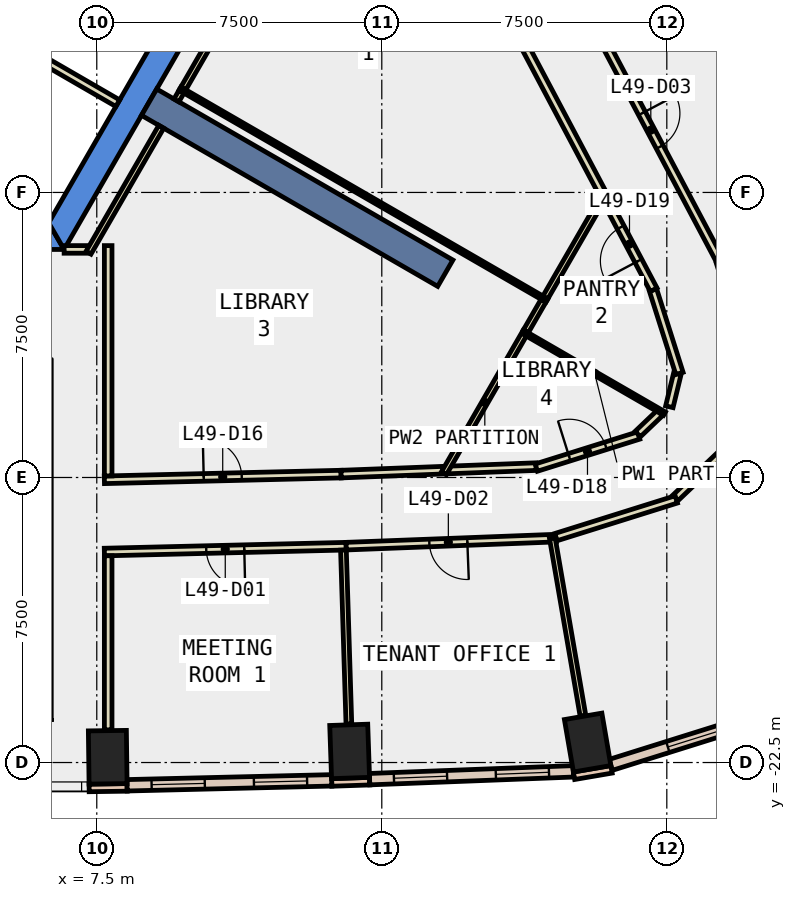
"""IFC4 building model, lengths in metres.
Left out: names, types, materials, properties, quantities, classifications, styles, units other than length and angle.
Written with IfcOpenShell. Run it as: python <this file> out.ifc"""

import sys

from ifc_helpers import new_model, si_unit, direction, frame, frame_2d, origin, origin_2d, place, context, subcontext, project, spatial, polyline, rectangle, outline, extrude, element, fill, save


model = new_model("IFC4")
c1 = context("Model", 3, precision=1e-05, world=origin(), true_north=direction((0.0, 1.0)))
c2 = subcontext(c1, "Body", "Model", "MODEL_VIEW")
j1 = project(units=[si_unit("LENGTHUNIT", "METRE"), si_unit("PLANEANGLEUNIT", "RADIAN")], contexts=[c1])
p1 = place(None, origin())
s1 = spatial("IfcSite", under=j1, at=p1, CompositionType="ELEMENT")
p2 = place(p1, origin())
s2 = spatial("IfcBuilding", under=s1, at=p2, CompositionType="ELEMENT")
p3 = place(p2, frame((0.0, 0.0, 219.2)))
s3 = spatial("IfcBuildingStorey", under=s2, at=p3, CompositionType="ELEMENT", Elevation=219.2)
for number, where, z_axis, x_axis in (
    (1, (7.788, -22.361, -0.4), (0.0, 0.0, 1.0), (1.0, 0.013, 0.0)),
    (2, (14.154, -22.208, -0.4), (0.0, 0.0, 1.0), (0.999, 0.034, 0.0)),
    (3, (20.417, -21.975, -0.4), (0.0, 0.0, 1.0), (0.986, 0.169, 0.0)),
):
    element("IfcColumn", number, at=place(p3, frame(where, z_axis=z_axis, x_axis=x_axis)), inside=s3, PredefinedType="COLUMN", context=c2, shape_type="SweptSolid", body=[
        extrude(rectangle(XDim=1.0, YDim=1.4, at=origin_2d()), origin(), (0.0, 0.0, 1.0), 4.2),
    ])
p4 = place(p3, frame((0.0, 0.0, -0.4)))
e4 = element("IfcWall", 4, at=p4, inside=s3, PredefinedType="SHEAR", context=c2, shape_type="SweptSolid", body=[
    extrude(outline(polyline([(5.75, -8.3), (5.75, -9.0), (6.64, -9.0), (6.235, -8.3), (5.75, -8.3)])), origin(), (0.0, 0.0, 1.0), 4.2),
])
p5 = place(p3, frame((0.0, 0.0, -0.4)))
e5 = element("IfcWall", 5, at=p5, inside=s3, PredefinedType="SHEAR", context=c2, shape_type="SweptSolid", body=[
    extrude(outline(polyline([(6.64, -9.0), (13.279, 2.5), (12.471, 2.5), (6.235, -8.3), (6.64, -9.0)])), origin(), (0.0, 0.0, 1.0), 4.2),
])
p6 = place(p3, frame((8.877, -5.125, -0.4), z_axis=(0.0, 0.0, 1.0), x_axis=(0.866017533419, -0.500013631625, 0.0)))
e6 = element("IfcWall", 6, at=p6, inside=s3, PredefinedType="SHEAR", context=c2, shape_type="SweptSolid", body=[
    extrude(rectangle(XDim=9.0, YDim=0.8, at=frame_2d((4.5, 0.0))), origin(), (0.0, 0.0, 1.0), 4.2),
])
p7 = place(p3, frame((7.299, -23.168, 0.0), z_axis=(0.0, 0.0, 1.0), x_axis=(0.999903186316, 0.013914668364, 0.0)))
e7 = element("IfcWall", 7, at=p7, inside=s3, PredefinedType="STANDARD", context=c2, shape_type="SweptSolid", body=[
    extrude(rectangle(XDim=1.0, YDim=0.2, at=frame_2d((0.5, 0.0))), origin(), (0.0, 0.0, 1.0), 3.8),
])
p8 = place(p3, frame((13.682, -23.024, 0.0), z_axis=(0.0, 0.0, 1.0), x_axis=(0.999423561854, 0.033949138587, 0.0)))
e8 = element("IfcWall", 8, at=p8, inside=s3, PredefinedType="STANDARD", context=c2, shape_type="SweptSolid", body=[
    extrude(rectangle(XDim=1.0, YDim=0.2, at=frame_2d((0.5, 0.0))), origin(), (0.0, 0.0, 1.0), 3.8),
])
p9 = place(p3, frame((20.059, -22.848, 0.0), z_axis=(0.0, 0.0, 1.0), x_axis=(0.985631544579, 0.168909615862, 0.0)))
e9 = element("IfcWall", 9, at=p9, inside=s3, PredefinedType="STANDARD", context=c2, shape_type="SweptSolid", body=[
    extrude(rectangle(XDim=1.0, YDim=0.2, at=frame_2d((0.5, 0.0))), origin(), (0.0, 0.0, 1.0), 3.8),
])
p10 = place(p3, frame((8.297, -23.099, 0.0), z_axis=(0.0, 0.0, 1.0), x_axis=(0.999708030006, 0.024163086341, 0.0)))
e10 = element("IfcWall", 10, at=p10, inside=s3, PredefinedType="STANDARD", context=c2, shape_type="SweptSolid", body=[
    extrude(rectangle(XDim=5.385, YDim=0.3, at=frame_2d((2.693, 0.0))), origin(), (0.0, 0.0, 1.0), 3.8),
])
p11 = place(p10, frame((0.646, 0.0, 0.9)))
e11 = element("IfcOpeningElement", 11, at=p11, cuts=e10, PredefinedType="OPENING", context=c2, shape_type="SweptSolid", body=[
    extrude(rectangle(XDim=1.4, YDim=2.6, at=frame_2d((0.7, 1.3))), frame((0.0, 0.16, 0.0), z_axis=(0.0, -1.0, 0.0), x_axis=(1.0, 0.0, 0.0)), (0.0, 0.0, 1.0), 0.32),
])
p12 = place(p10, frame((3.339, 0.0, 0.9)))
e12 = element("IfcOpeningElement", 12, at=p12, cuts=e10, PredefinedType="OPENING", context=c2, shape_type="SweptSolid", body=[
    extrude(rectangle(XDim=1.4, YDim=2.6, at=frame_2d((0.7, 1.3))), frame((0.0, 0.16, 0.0), z_axis=(0.0, -1.0, 0.0), x_axis=(1.0, 0.0, 0.0)), (0.0, 0.0, 1.0), 0.32),
])
p13 = place(p3, frame((14.679, -22.938, 0.0), z_axis=(0.0, 0.0, 1.0), x_axis=(0.99926218254, 0.038406907512, 0.0)))
e13 = element("IfcWall", 13, at=p13, inside=s3, PredefinedType="STANDARD", context=c2, shape_type="SweptSolid", body=[
    extrude(rectangle(XDim=5.365, YDim=0.3, at=frame_2d((2.683, 0.0))), origin(), (0.0, 0.0, 1.0), 3.8),
])
p14 = place(p13, frame((0.641, 0.0, 0.9)))
e14 = element("IfcOpeningElement", 14, at=p14, cuts=e13, PredefinedType="OPENING", context=c2, shape_type="SweptSolid", body=[
    extrude(rectangle(XDim=1.4, YDim=2.6, at=frame_2d((0.7, 1.3))), frame((0.0, 0.16, 0.0), z_axis=(0.0, -1.0, 0.0), x_axis=(1.0, 0.0, 0.0)), (0.0, 0.0, 1.0), 0.32),
])
p15 = place(p13, frame((3.324, 0.0, 0.9)))
e15 = element("IfcOpeningElement", 15, at=p15, cuts=e13, PredefinedType="OPENING", context=c2, shape_type="SweptSolid", body=[
    extrude(rectangle(XDim=1.4, YDim=2.6, at=frame_2d((0.7, 1.3))), frame((0.0, 0.16, 0.0), z_axis=(0.0, -1.0, 0.0), x_axis=(1.0, 0.0, 0.0)), (0.0, 0.0, 1.0), 0.32),
])
p16 = place(p3, frame((21.024, -22.562, 0.0), z_axis=(0.0, 0.0, 1.0), x_axis=(0.954297481837, 0.298858354675, 0.0)))
e16 = element("IfcWall", 16, at=p16, inside=s3, PredefinedType="STANDARD", context=c2, shape_type="SweptSolid", body=[
    extrude(rectangle(XDim=4.551, YDim=0.3, at=frame_2d((2.275, 0.0))), origin(), (0.0, 0.0, 1.0), 3.8),
])
p17 = place(p16, frame((1.575, 0.0, 0.9)))
e17 = element("IfcOpeningElement", 17, at=p17, cuts=e16, PredefinedType="OPENING", context=c2, shape_type="SweptSolid", body=[
    extrude(rectangle(XDim=1.4, YDim=2.6, at=frame_2d((0.7, 1.3))), frame((0.0, 0.16, 0.0), z_axis=(0.0, -1.0, 0.0), x_axis=(1.0, 0.0, 0.0)), (0.0, 0.0, 1.0), 0.32),
])
p18 = place(p3, frame((7.7, -15.061, 0.0), z_axis=(0.0, 0.0, 1.0), x_axis=(0.999709615165, 0.024097413707, 0.0)))
e18 = element("IfcWall", 18, at=p18, inside=s3, PredefinedType="PARTITIONING", context=c2, shape_type="SweptSolid", body=[
    extrude(rectangle(XDim=6.231, YDim=0.2, at=frame_2d((3.115, 0.0))), origin(), (0.0, 0.0, 1.0), 3.8),
])
p19 = place(p18, frame((2.615, 0.0, 0.0)))
e19 = element("IfcOpeningElement", 19, at=p19, cuts=e18, PredefinedType="OPENING", context=c2, shape_type="SweptSolid", body=[
    extrude(rectangle(XDim=1.0, YDim=2.1, at=frame_2d((0.5, 1.05))), frame((0.0, 0.11, 0.0), z_axis=(0.0, -1.0, 0.0), x_axis=(1.0, 0.0, 0.0)), (0.0, 0.0, 1.0), 0.22),
])
p20 = place(p3, frame((13.929, -14.911, 0.0), z_axis=(0.0, 0.0, 1.0), x_axis=(0.99926480204, 0.038338693307, 0.0)))
e20 = element("IfcWall", 20, at=p20, inside=s3, PredefinedType="PARTITIONING", context=c2, shape_type="SweptSolid", body=[
    extrude(rectangle(XDim=2.681, YDim=0.2, at=frame_2d((1.34, 0.0))), origin(), (0.0, 0.0, 1.0), 3.8),
])
p21 = place(p3, frame((20.882, -7.659, 0.0), z_axis=(0.0, 0.0, 1.0), x_axis=(-0.468206254133, 0.883619207346, 0.0)))
e21 = element("IfcWall", 21, at=p21, inside=s3, PredefinedType="PARTITIONING", context=c2, shape_type="SweptSolid", body=[
    extrude(rectangle(XDim=4.93, YDim=0.2, at=frame_2d((2.465, 0.0))), origin(), (0.0, 0.0, 1.0), 3.8),
])
p22 = place(p3, frame((16.757, -14.802, 0.0), z_axis=(0.0, 0.0, 1.0), x_axis=(0.999273784151, 0.038103862122, 0.0)))
e22 = element("IfcWall", 22, at=p22, inside=s3, PredefinedType="PARTITIONING", context=c2, shape_type="SweptSolid", body=[
    extrude(rectangle(XDim=2.307, YDim=0.2, at=frame_2d((1.153, 0.0))), origin(), (0.0, 0.0, 1.0), 3.8),
])
p23 = place(p3, frame((19.066, -14.74, 0.0), z_axis=(0.0, 0.0, 1.0), x_axis=(0.954238004552, 0.299048207935, 0.0)))
e23 = element("IfcWall", 23, at=p23, inside=s3, PredefinedType="PARTITIONING", context=c2, shape_type="SweptSolid", body=[
    extrude(rectangle(XDim=2.822, YDim=0.2, at=frame_2d((1.411, 0.0))), origin(), (0.0, 0.0, 1.0), 3.8),
])
p24 = place(p23, frame((0.911, 0.0, 0.0)))
e24 = element("IfcOpeningElement", 24, at=p24, cuts=e23, PredefinedType="OPENING", context=c2, shape_type="SweptSolid", body=[
    extrude(rectangle(XDim=1.0, YDim=2.1, at=frame_2d((0.5, 1.05))), frame((0.0, 0.11, 0.0), z_axis=(0.0, -1.0, 0.0), x_axis=(1.0, 0.0, 0.0)), (0.0, 0.0, 1.0), 0.22),
])
p25 = place(p3, frame((21.736, -13.857, 0.0), z_axis=(0.0, 0.0, 1.0), x_axis=(0.723666760573, 0.690149563241, 0.0)))
e25 = element("IfcWall", 25, at=p25, inside=s3, PredefinedType="PARTITIONING", context=c2, shape_type="SweptSolid", body=[
    extrude(rectangle(XDim=0.801, YDim=0.2, at=frame_2d((0.401, 0.0))), origin(), (0.0, 0.0, 1.0), 3.8),
])
p26 = place(p3, frame((22.567, -13.139, 0.0), z_axis=(0.0, 0.0, 1.0), x_axis=(0.2356388299, 0.971840697771, 0.0)))
e26 = element("IfcWall", 26, at=p26, inside=s3, PredefinedType="PARTITIONING", context=c2, shape_type="SweptSolid", body=[
    extrude(rectangle(XDim=0.9, YDim=0.2, at=frame_2d((0.45, 0.0))), origin(), (0.0, 0.0, 1.0), 3.8),
])
p27 = place(p3, frame((22.833, -12.262, 0.0), z_axis=(0.0, 0.0, 1.0), x_axis=(-0.302262657712, 0.953224677478, 0.0)))
e27 = element("IfcWall", 27, at=p27, inside=s3, PredefinedType="PARTITIONING", context=c2, shape_type="SweptSolid", body=[
    extrude(rectangle(XDim=2.303, YDim=0.2, at=frame_2d((1.151, 0.0))), origin(), (0.0, 0.0, 1.0), 3.8),
])
p28 = place(p3, frame((22.154, -10.06, 0.0), z_axis=(0.0, 0.0, 1.0), x_axis=(-0.468114756541, 0.883667683413, 0.0)))
e28 = element("IfcWall", 28, at=p28, inside=s3, PredefinedType="PARTITIONING", context=c2, shape_type="SweptSolid", body=[
    extrude(rectangle(XDim=2.717, YDim=0.2, at=frame_2d((1.359, 0.0))), origin(), (0.0, 0.0, 1.0), 3.8),
])
p29 = place(p28, frame((0.859, 0.0, 0.0)))
e29 = element("IfcOpeningElement", 29, at=p29, cuts=e28, PredefinedType="OPENING", context=c2, shape_type="SweptSolid", body=[
    extrude(rectangle(XDim=1.0, YDim=2.1, at=frame_2d((0.5, 1.05))), frame((0.0, 0.11, 0.0), z_axis=(0.0, -1.0, 0.0), x_axis=(1.0, 0.0, 0.0)), (0.0, 0.0, 1.0), 0.22),
])
p30 = place(p3, frame((14.063, -16.808, 0.0), z_axis=(0.0, 0.0, 1.0), x_axis=(-0.999707980382, -0.024165139379, 0.0)))
e30 = element("IfcWall", 30, at=p30, inside=s3, PredefinedType="PARTITIONING", context=c2, shape_type="SweptSolid", body=[
    extrude(rectangle(XDim=6.365, YDim=0.2, at=frame_2d((3.183, 0.0))), origin(), (0.0, 0.0, 1.0), 3.8),
])
p31 = place(p30, frame((2.683, 0.0, 0.0)))
e31 = element("IfcOpeningElement", 31, at=p31, cuts=e30, PredefinedType="OPENING", context=c2, shape_type="SweptSolid", body=[
    extrude(rectangle(XDim=1.0, YDim=2.1, at=frame_2d((0.5, 1.05))), frame((0.0, 0.11, 0.0), z_axis=(0.0, -1.0, 0.0), x_axis=(1.0, 0.0, 0.0)), (0.0, 0.0, 1.0), 0.22),
])
p32 = place(p3, frame((19.588, -16.595, 0.0), z_axis=(0.0, 0.0, 1.0), x_axis=(-0.999265212989, -0.038327980772, 0.0)))
e32 = element("IfcWall", 32, at=p32, inside=s3, PredefinedType="PARTITIONING", context=c2, shape_type="SweptSolid", body=[
    extrude(rectangle(XDim=5.529, YDim=0.2, at=frame_2d((2.765, 0.0))), origin(), (0.0, 0.0, 1.0), 3.8),
])
p33 = place(p32, frame((2.339, 0.0, 0.0)))
e33 = element("IfcOpeningElement", 33, at=p33, cuts=e32, PredefinedType="OPENING", context=c2, shape_type="SweptSolid", body=[
    extrude(rectangle(XDim=1.0, YDim=2.1, at=frame_2d((0.5, 1.05))), frame((0.0, 0.11, 0.0), z_axis=(0.0, -1.0, 0.0), x_axis=(1.0, 0.0, 0.0)), (0.0, 0.0, 1.0), 0.22),
])
p34 = place(p3, frame((20.245, -2.398, 0.0), z_axis=(0.0, 0.0, 1.0), x_axis=(0.468063775621, -0.883694688199, 0.0)))
e34 = element("IfcWall", 34, at=p34, inside=s3, PredefinedType="PARTITIONING", context=c2, shape_type="SweptSolid", body=[
    extrude(rectangle(XDim=7.836, YDim=0.2, at=frame_2d((3.918, 0.0))), origin(), (0.0, 0.0, 1.0), 3.8),
])
p35 = place(p34, frame((3.418, 0.0, 0.0)))
e35 = element("IfcOpeningElement", 35, at=p35, cuts=e34, PredefinedType="OPENING", context=c2, shape_type="SweptSolid", body=[
    extrude(rectangle(XDim=1.0, YDim=2.1, at=frame_2d((0.5, 1.05))), frame((0.0, 0.11, 0.0), z_axis=(0.0, -1.0, 0.0), x_axis=(1.0, 0.0, 0.0)), (0.0, 0.0, 1.0), 0.22),
])
p36 = place(p3, frame((23.897, -9.33, 0.0), z_axis=(0.0, 0.0, 1.0), x_axis=(0.302200639646, -0.953244340868, 0.0)))
e36 = element("IfcWall", 36, at=p36, inside=s3, PredefinedType="PARTITIONING", context=c2, shape_type="SweptSolid", body=[
    extrude(rectangle(XDim=3.004, YDim=0.2, at=frame_2d((1.502, 0.0))), origin(), (0.0, 0.0, 1.0), 3.8),
])
p37 = place(p3, frame((24.378, -13.964, 0.0), z_axis=(0.0, 0.0, 1.0), x_axis=(-0.723967420116, -0.689834164571, 0.0)))
e37 = element("IfcWall", 37, at=p37, inside=s3, PredefinedType="PARTITIONING", context=c2, shape_type="SweptSolid", body=[
    extrude(rectangle(XDim=2.282, YDim=0.2, at=frame_2d((1.141, 0.0))), origin(), (0.0, 0.0, 1.0), 3.8),
])
p38 = place(p3, frame((22.749, -15.577, 0.0), z_axis=(0.0, 0.0, 1.0), x_axis=(-0.954238750745, -0.299045826884, 0.0)))
e38 = element("IfcWall", 38, at=p38, inside=s3, PredefinedType="PARTITIONING", context=c2, shape_type="SweptSolid", body=[
    extrude(rectangle(XDim=3.318, YDim=0.2, at=frame_2d((1.659, 0.0))), origin(), (0.0, 0.0, 1.0), 3.8),
])
p39 = place(p3, frame((8.053, -5.152, 0.0), z_axis=(0.0, 0.0, 1.0), x_axis=(-0.865808344015, 0.500375770231, 0.0)))
e39 = element("IfcWall", 39, at=p39, inside=s3, PredefinedType="PARTITIONING", context=c2, shape_type="SweptSolid", body=[
    extrude(rectangle(XDim=2.9, YDim=0.2, at=frame_2d((1.45, 0.0))), origin(), (0.0, 0.0, 1.0), 3.8),
])
p40 = place(p3, frame((6.641, -8.999, 0.0), z_axis=(0.0, 0.0, 1.0), x_axis=(1.0, 0.0, 0.0)))
e40 = element("IfcWall", 40, at=p40, inside=s3, PredefinedType="PARTITIONING", context=c2, shape_type="SweptSolid", body=[
    extrude(rectangle(XDim=0.617, YDim=0.2, at=frame_2d((0.309, 0.0))), origin(), (0.0, 0.0, 1.0), 3.8),
])
p41 = place(p3, frame((7.283, -9.086, 0.0), z_axis=(0.0, 0.0, 1.0), x_axis=(0.500035303972, 0.866005020067, 0.0)))
e41 = element("IfcWall", 41, at=p41, inside=s3, PredefinedType="PARTITIONING", context=c2, shape_type="SweptSolid", body=[
    extrude(rectangle(XDim=3.828, YDim=0.15, at=frame_2d((1.914, 0.0))), origin(), (0.0, 0.0, 1.0), 3.8),
])
p42 = place(p3, frame((9.779, -4.762, 0.0), z_axis=(0.0, 0.0, 1.0), x_axis=(0.499990552429, 0.866030858274, 0.0)))
e42 = element("IfcWall", 42, at=p42, inside=s3, PredefinedType="PARTITIONING", context=c2, shape_type="SweptSolid", body=[
    extrude(rectangle(XDim=9.906, YDim=0.15, at=frame_2d((4.953, 0.0))), origin(), (0.0, 0.0, 1.0), 3.8),
])
p43 = place(p3, frame((7.8, -8.899, 0.0), z_axis=(0.0, 0.0, 1.0), x_axis=(0.0, -1.0, 0.0)))
e43 = element("IfcWall", 43, at=p43, inside=s3, PredefinedType="PARTITIONING", context=c2, shape_type="SweptSolid", body=[
    extrude(rectangle(XDim=6.06, YDim=0.2, at=frame_2d((3.03, 0.0))), origin(), (0.0, 0.0, 1.0), 3.8),
])
p44 = place(p3, frame((7.8, -17.059, 0.0), z_axis=(0.0, 0.0, 1.0), x_axis=(0.0, -1.0, 0.0)))
e44 = element("IfcWall", 44, at=p44, inside=s3, PredefinedType="PARTITIONING", context=c2, shape_type="SweptSolid", body=[
    extrude(rectangle(XDim=4.582, YDim=0.2, at=frame_2d((2.291, 0.0))), origin(), (0.0, 0.0, 1.0), 3.8),
])
p45 = place(p3, frame((9.689, -4.768, 0.0), z_axis=(0.0, 0.0, 1.0), x_axis=(0.866023322577, -0.500003604739, 0.0)))
e45 = element("IfcWall", 45, at=p45, inside=s3, PredefinedType="PARTITIONING", context=c2, shape_type="SweptSolid", body=[
    extrude(rectangle(XDim=11.15, YDim=0.1, at=frame_2d((5.575, 0.0))), origin(), (0.0, 0.0, 1.0), 3.8),
])
p46 = place(p3, frame((18.789, -11.156, 0.0), z_axis=(0.0, 0.0, 1.0), x_axis=(-0.499822078765, -0.866128102292, 0.0)))
e46 = element("IfcWall", 46, at=p46, inside=s3, PredefinedType="PARTITIONING", context=c2, shape_type="SweptSolid", body=[
    extrude(rectangle(XDim=4.313, YDim=0.15, at=frame_2d((2.157, 0.0))), origin(), (0.0, 0.0, 1.0), 3.8),
])
p47 = place(p3, frame((19.255, -10.349, 0.0), z_axis=(0.0, 0.0, 1.0), x_axis=(-0.499185199876, -0.866495318063, 0.0)))
e47 = element("IfcWall", 47, at=p47, inside=s3, PredefinedType="PARTITIONING", context=c2, shape_type="SweptSolid", body=[
    extrude(rectangle(XDim=0.931, YDim=0.15, at=frame_2d((0.466, 0.0))), origin(), (0.0, 0.0, 1.0), 3.8),
])
p48 = place(p3, frame((20.847, -7.593, 0.0), z_axis=(0.0, 0.0, 1.0), x_axis=(-0.500261762561, -0.865874222343, 0.0)))
e48 = element("IfcWall", 48, at=p48, inside=s3, PredefinedType="PARTITIONING", context=c2, shape_type="SweptSolid", body=[
    extrude(rectangle(XDim=3.082, YDim=0.15, at=frame_2d((1.541, 0.0))), origin(), (0.0, 0.0, 1.0), 3.8),
])
p49 = place(p3, frame((18.765, -11.199, 0.0), z_axis=(0.0, 0.0, 1.0), x_axis=(0.866038964406, -0.499976511579, 0.0)))
e49 = element("IfcWall", 49, at=p49, inside=s3, PredefinedType="PARTITIONING", context=c2, shape_type="SweptSolid", body=[
    extrude(rectangle(XDim=4.242, YDim=0.1, at=frame_2d((2.121, 0.0))), origin(), (0.0, 0.0, 1.0), 3.8),
])
p50 = place(p3, frame((13.991, -16.91, 0.0), z_axis=(0.0, 0.0, 1.0), x_axis=(0.031234752378, -0.999512076087, 0.0)))
e50 = element("IfcWall", 50, at=p50, inside=s3, PredefinedType="PARTITIONING", context=c2, shape_type="SweptSolid", body=[
    extrude(rectangle(XDim=4.58, YDim=0.15, at=frame_2d((2.29, 0.0))), origin(), (0.0, 0.0, 1.0), 3.8),
])
p51 = place(p3, frame((19.488, -16.599, 0.0), z_axis=(0.0, 0.0, 1.0), x_axis=(0.169963884325, -0.985450292011, 0.0)))
e51 = element("IfcWall", 51, at=p51, inside=s3, PredefinedType="PARTITIONING", context=c2, shape_type="SweptSolid", body=[
    extrude(rectangle(XDim=4.736, YDim=0.15, at=frame_2d((2.368, 0.0))), origin(), (0.0, 0.0, 1.0), 3.8),
])
p52 = place(p3, frame((9.596, -5.079, 0.0), z_axis=(0.0, 0.0, 1.0), x_axis=(0.500782702656, 0.865573038351, 0.0)))
e52 = element("IfcWall", 52, at=p52, inside=s3, PredefinedType="PARTITIONING", context=c2, shape_type="SweptSolid", body=[
    extrude(rectangle(XDim=0.266, YDim=0.15, at=frame_2d((0.133, 0.0))), origin(), (0.0, 0.0, 1.0), 3.8),
])
p53 = place(p3, frame((5.492, -3.788, 0.0), z_axis=(0.0, 0.0, 1.0), x_axis=(0.500034260056, 0.866005622828, 0.0)))
e53 = element("IfcWall", 53, at=p53, inside=s3, PredefinedType="STANDARD", context=c2, shape_type="SweptSolid", body=[
    extrude(rectangle(XDim=5.399, YDim=0.2, at=frame_2d((2.7, 0.0))), origin(), (0.0, 0.0, 1.0), 3.8),
])
p54 = place(p11, origin())
e54 = element("IfcWindow", 54, at=p54, inside=s3, PartitioningType="SINGLE_PANEL", PredefinedType="WINDOW", context=c2, shape_type="SweptSolid", body=[
    extrude(rectangle(XDim=1.4, YDim=2.6, at=frame_2d((0.7, 1.3))), frame((0.0, 0.03, 0.0), z_axis=(0.0, -1.0, 0.0), x_axis=(1.0, 0.0, 0.0)), (0.0, 0.0, 1.0), 0.06),
])
fill(e11, e54)
p55 = place(p12, origin())
e55 = element("IfcWindow", 55, at=p55, inside=s3, PartitioningType="SINGLE_PANEL", PredefinedType="WINDOW", context=c2, shape_type="SweptSolid", body=[
    extrude(rectangle(XDim=1.4, YDim=2.6, at=frame_2d((0.7, 1.3))), frame((0.0, 0.03, 0.0), z_axis=(0.0, -1.0, 0.0), x_axis=(1.0, 0.0, 0.0)), (0.0, 0.0, 1.0), 0.06),
])
fill(e12, e55)
p56 = place(p14, origin())
e56 = element("IfcWindow", 56, at=p56, inside=s3, PartitioningType="SINGLE_PANEL", PredefinedType="WINDOW", context=c2, shape_type="SweptSolid", body=[
    extrude(rectangle(XDim=1.4, YDim=2.6, at=frame_2d((0.7, 1.3))), frame((0.0, 0.03, 0.0), z_axis=(0.0, -1.0, 0.0), x_axis=(1.0, 0.0, 0.0)), (0.0, 0.0, 1.0), 0.06),
])
fill(e14, e56)
p57 = place(p15, origin())
e57 = element("IfcWindow", 57, at=p57, inside=s3, PartitioningType="SINGLE_PANEL", PredefinedType="WINDOW", context=c2, shape_type="SweptSolid", body=[
    extrude(rectangle(XDim=1.4, YDim=2.6, at=frame_2d((0.7, 1.3))), frame((0.0, 0.03, 0.0), z_axis=(0.0, -1.0, 0.0), x_axis=(1.0, 0.0, 0.0)), (0.0, 0.0, 1.0), 0.06),
])
fill(e15, e57)
p58 = place(p17, origin())
e58 = element("IfcWindow", 58, at=p58, inside=s3, PartitioningType="SINGLE_PANEL", PredefinedType="WINDOW", context=c2, shape_type="SweptSolid", body=[
    extrude(rectangle(XDim=1.4, YDim=2.6, at=frame_2d((0.7, 1.3))), frame((0.0, 0.03, 0.0), z_axis=(0.0, -1.0, 0.0), x_axis=(1.0, 0.0, 0.0)), (0.0, 0.0, 1.0), 0.06),
])
fill(e17, e58)
p59 = place(p31, origin())
e59 = element("IfcDoor", 59, at=p59, inside=s3, OperationType="SINGLE_SWING_LEFT", PredefinedType="DOOR", context=c2, shape_type="SweptSolid", body=[
    extrude(rectangle(XDim=1.0, YDim=2.1, at=frame_2d((0.5, 1.05))), frame((0.0, 0.025, 0.0), z_axis=(0.0, -1.0, 0.0), x_axis=(1.0, 0.0, 0.0)), (0.0, 0.0, 1.0), 0.05),
])
fill(e31, e59)
p60 = place(p33, origin())
e60 = element("IfcDoor", 60, at=p60, inside=s3, OperationType="SINGLE_SWING_LEFT", PredefinedType="DOOR", context=c2, shape_type="SweptSolid", body=[
    extrude(rectangle(XDim=1.0, YDim=2.1, at=frame_2d((0.5, 1.05))), frame((0.0, 0.025, 0.0), z_axis=(0.0, -1.0, 0.0), x_axis=(1.0, 0.0, 0.0)), (0.0, 0.0, 1.0), 0.05),
])
fill(e33, e60)
p61 = place(p35, origin())
e61 = element("IfcDoor", 61, at=p61, inside=s3, OperationType="SINGLE_SWING_LEFT", PredefinedType="DOOR", context=c2, shape_type="SweptSolid", body=[
    extrude(rectangle(XDim=1.0, YDim=2.1, at=frame_2d((0.5, 1.05))), frame((0.0, 0.025, 0.0), z_axis=(0.0, -1.0, 0.0), x_axis=(1.0, 0.0, 0.0)), (0.0, 0.0, 1.0), 0.05),
])
fill(e35, e61)
p62 = place(p19, origin())
e62 = element("IfcDoor", 62, at=p62, inside=s3, OperationType="SINGLE_SWING_LEFT", PredefinedType="DOOR", context=c2, shape_type="SweptSolid", body=[
    extrude(rectangle(XDim=1.0, YDim=2.1, at=frame_2d((0.5, 1.05))), frame((0.0, 0.025, 0.0), z_axis=(0.0, -1.0, 0.0), x_axis=(1.0, 0.0, 0.0)), (0.0, 0.0, 1.0), 0.05),
])
fill(e19, e62)
p63 = place(p24, origin())
e63 = element("IfcDoor", 63, at=p63, inside=s3, OperationType="SINGLE_SWING_LEFT", PredefinedType="DOOR", context=c2, shape_type="SweptSolid", body=[
    extrude(rectangle(XDim=1.0, YDim=2.1, at=frame_2d((0.5, 1.05))), frame((0.0, 0.025, 0.0), z_axis=(0.0, -1.0, 0.0), x_axis=(1.0, 0.0, 0.0)), (0.0, 0.0, 1.0), 0.05),
])
fill(e24, e63)
p64 = place(p29, origin())
e64 = element("IfcDoor", 64, at=p64, inside=s3, OperationType="SINGLE_SWING_LEFT", PredefinedType="DOOR", context=c2, shape_type="SweptSolid", body=[
    extrude(rectangle(XDim=1.0, YDim=2.1, at=frame_2d((0.5, 1.05))), frame((0.0, 0.025, 0.0), z_axis=(0.0, -1.0, 0.0), x_axis=(1.0, 0.0, 0.0)), (0.0, 0.0, 1.0), 0.05),
])
fill(e29, e64)
save(model, sys.argv[1])
